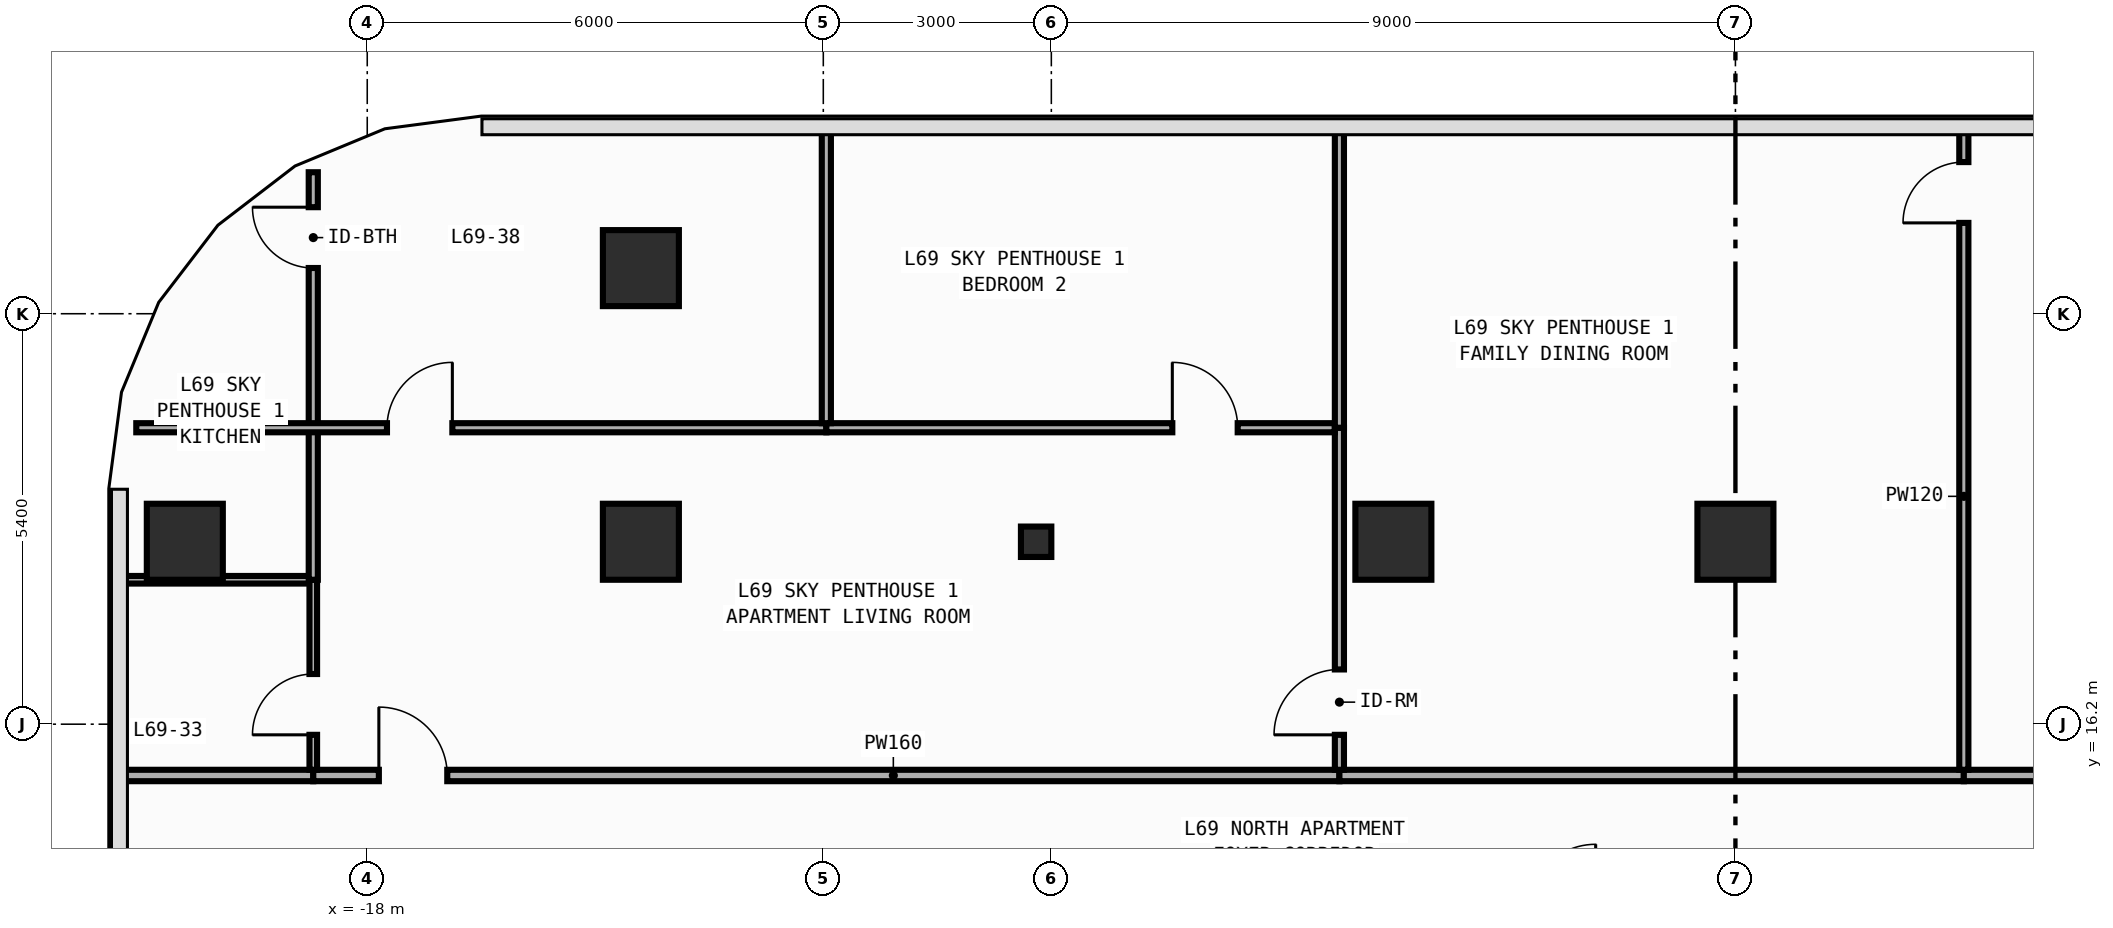
"""IFC4 building model, lengths in metres.
Left out: names, types, materials, properties, quantities, classifications, styles, units other than length and angle.
Written with IfcOpenShell. Run it as: python <this file> out.ifc"""

import sys

from ifc_helpers import new_model, si_unit, direction, frame, frame_2d, origin, origin_2d, place, context, subcontext, project, spatial, rectangle, circle, i_section, extrude, element, fill, save


model = new_model("IFC4")
c1 = context("Model", 3, precision=1e-05, world=origin(), true_north=direction((0.0, 1.0)))
c2 = subcontext(c1, "Body", "Model", "MODEL_VIEW")
j1 = project(units=[si_unit("LENGTHUNIT", "METRE"), si_unit("PLANEANGLEUNIT", "RADIAN")], contexts=[c1])
p1 = place(None, origin())
s1 = spatial("IfcSite", under=j1, at=p1, CompositionType="ELEMENT")
p2 = place(p1, origin())
s2 = spatial("IfcBuilding", under=s1, at=p2, CompositionType="ELEMENT")
p3 = place(p2, frame((0.0, 0.0, 289.0)))
s3 = spatial("IfcBuildingStorey", under=s2, at=p3, CompositionType="ELEMENT", Elevation=289.0)
p4 = place(p3, frame((-9.2, 18.6, 0.0), z_axis=(0.0, 0.0, 1.0), x_axis=(1.0, 0.0, 0.0)))
e1 = element("IfcColumn", 1, at=p4, inside=s3, PredefinedType="COLUMN", context=c2, shape_type="SweptSolid", body=[
    extrude(i_section(OverallWidth=0.4, OverallDepth=0.4, WebThickness=0.013, FlangeThickness=0.021, FilletRadius=0.022, at=origin_2d()), origin(), (0.0, 0.0, 1.0), 3.8),
])
for number, where, z_axis, x_axis in (
    (2, (-20.4, 18.6, 0.0), (0.0, 0.0, 1.0), (1.0, 0.0, 0.0)),
    (3, (-14.4, 18.6, 0.0), (0.0, 0.0, 1.0), (1.0, 0.0, 0.0)),
    (4, (-4.5, 18.6, 0.0), (0.0, 0.0, 1.0), (1.0, 0.0, 0.0)),
    (5, (0.0, 18.6, 0.0), (0.0, 0.0, 1.0), (1.0, 0.0, 0.0)),
    (6, (-14.4, 22.2, 0.0), (0.0, 0.0, 1.0), (1.0, 0.0, 0.0)),
):
    element("IfcColumn", number, at=place(p3, frame(where, z_axis=z_axis, x_axis=x_axis)), inside=s3, PredefinedType="COLUMN", context=c2, shape_type="SweptSolid", body=[
        extrude(circle(Radius=0.5, at=origin_2d()), origin(), (0.0, 0.0, 1.0), 3.8),
    ])
p5 = place(p3, frame((-21.255, 15.525, 0.0), z_axis=(0.0, 0.0, 1.0), x_axis=(1.0, 0.0, 0.0)))
e7 = element("IfcWall", 7, at=p5, inside=s3, PredefinedType="PARTITIONING", context=c2, shape_type="SweptSolid", body=[
    extrude(rectangle(XDim=2.545, YDim=0.15, at=frame_2d((1.272, 0.0))), origin(), (0.0, 0.0, 1.0), 3.54),
])
p6 = place(p3, frame((-18.71, 15.525, 0.0), z_axis=(0.0, 0.0, 1.0), x_axis=(1.0, 0.0, 0.0)))
e8 = element("IfcWall", 8, at=p6, inside=s3, PredefinedType="PARTITIONING", context=c2, shape_type="SweptSolid", body=[
    extrude(rectangle(XDim=13.5, YDim=0.15, at=frame_2d((6.75, 0.0))), origin(), (0.0, 0.0, 1.0), 3.54),
])
p7 = place(p6, frame((0.863, 0.0, 0.0)))
e9 = element("IfcOpeningElement", 9, at=p7, cuts=e8, PredefinedType="OPENING", context=c2, shape_type="SweptSolid", body=[
    extrude(rectangle(XDim=0.9, YDim=2.15, at=frame_2d((0.45, 1.075))), frame((0.0, 0.085, 0.0), z_axis=(0.0, -1.0, 0.0), x_axis=(1.0, 0.0, 0.0)), (0.0, 0.0, 1.0), 0.17),
])
p8 = place(p3, frame((-5.21, 15.525, 0.0), z_axis=(0.0, 0.0, 1.0), x_axis=(1.0, 0.0, 0.0)))
e10 = element("IfcWall", 10, at=p8, inside=s3, PredefinedType="PARTITIONING", context=c2, shape_type="SweptSolid", body=[
    extrude(rectangle(XDim=8.215, YDim=0.15, at=frame_2d((4.107, 0.0))), origin(), (0.0, 0.0, 1.0), 3.54),
])
p9 = place(p3, frame((3.005, 15.525, 0.0), z_axis=(0.0, 0.0, 1.0), x_axis=(1.0, 0.0, 0.0)))
e11 = element("IfcWall", 11, at=p9, inside=s3, PredefinedType="PARTITIONING", context=c2, shape_type="SweptSolid", body=[
    extrude(rectangle(XDim=6.435, YDim=0.15, at=frame_2d((3.218, 0.0))), origin(), (0.0, 0.0, 1.0), 3.54),
])
p10 = place(p3, frame((-21.255, 18.1, 0.0), z_axis=(0.0, 0.0, 1.0), x_axis=(1.0, 0.0, 0.0)))
e12 = element("IfcWall", 12, at=p10, inside=s3, PredefinedType="PARTITIONING", context=c2, shape_type="SweptSolid", body=[
    extrude(rectangle(XDim=2.495, YDim=0.1, at=frame_2d((1.248, 0.0))), origin(), (0.0, 0.0, 1.0), 3.54),
])
p11 = place(p3, frame((-18.71, 15.6, 0.0), z_axis=(0.0, 0.0, 1.0), x_axis=(0.0, 1.0, 0.0)))
e13 = element("IfcWall", 13, at=p11, inside=s3, PredefinedType="PARTITIONING", context=c2, shape_type="SweptSolid", body=[
    extrude(rectangle(XDim=2.5, YDim=0.1, at=frame_2d((1.25, 0.0))), origin(), (0.0, 0.0, 1.0), 3.54),
])
p12 = place(p11, frame((0.46, 0.0, 0.0)))
e14 = element("IfcOpeningElement", 14, at=p12, cuts=e13, PredefinedType="OPENING", context=c2, shape_type="SweptSolid", body=[
    extrude(rectangle(XDim=0.8, YDim=2.1, at=frame_2d((0.4, 1.05))), frame((0.0, 0.06, 0.0), z_axis=(0.0, -1.0, 0.0), x_axis=(1.0, 0.0, 0.0)), (0.0, 0.0, 1.0), 0.12),
])
p13 = place(p3, frame((-18.71, 18.1, 0.0), z_axis=(0.0, 0.0, 1.0), x_axis=(0.0, 1.0, 0.0)))
e15 = element("IfcWall", 15, at=p13, inside=s3, PredefinedType="PARTITIONING", context=c2, shape_type="SweptSolid", body=[
    extrude(rectangle(XDim=2.0, YDim=0.12, at=frame_2d((1.0, 0.0))), origin(), (0.0, 0.0, 1.0), 3.54),
])
p14 = place(p3, frame((-18.71, 20.1, 0.0), z_axis=(0.0, 0.0, 1.0), x_axis=(0.0, 1.0, 0.0)))
e16 = element("IfcWall", 16, at=p14, inside=s3, PredefinedType="PARTITIONING", context=c2, shape_type="SweptSolid", body=[
    extrude(rectangle(XDim=3.361, YDim=0.12, at=frame_2d((1.681, 0.0))), origin(), (0.0, 0.0, 1.0), 3.54),
])
p15 = place(p14, frame((2.102, 0.0, 0.0)))
e17 = element("IfcOpeningElement", 17, at=p15, cuts=e16, PredefinedType="OPENING", context=c2, shape_type="SweptSolid", body=[
    extrude(rectangle(XDim=0.8, YDim=2.1, at=frame_2d((0.4, 1.05))), frame((0.0, 0.07, 0.0), z_axis=(0.0, -1.0, 0.0), x_axis=(1.0, 0.0, 0.0)), (0.0, 0.0, 1.0), 0.14),
])
p16 = place(p3, frame((-5.21, 15.6, 0.0), z_axis=(0.0, 0.0, 1.0), x_axis=(0.0, 1.0, 0.0)))
e18 = element("IfcWall", 18, at=p16, inside=s3, PredefinedType="PARTITIONING", context=c2, shape_type="SweptSolid", body=[
    extrude(rectangle(XDim=4.5, YDim=0.12, at=frame_2d((2.25, 0.0))), origin(), (0.0, 0.0, 1.0), 3.54),
])
p17 = place(p16, frame((0.46, 0.0, 0.0)))
e19 = element("IfcOpeningElement", 19, at=p17, cuts=e18, PredefinedType="OPENING", context=c2, shape_type="SweptSolid", body=[
    extrude(rectangle(XDim=0.86, YDim=2.15, at=frame_2d((0.43, 1.075))), frame((0.0, 0.07, 0.0), z_axis=(0.0, -1.0, 0.0), x_axis=(1.0, 0.0, 0.0)), (0.0, 0.0, 1.0), 0.14),
])
p18 = place(p3, frame((-21.039, 20.1, 0.0), z_axis=(0.0, 0.0, 1.0), x_axis=(1.0, 0.0, 0.0)))
e20 = element("IfcWall", 20, at=p18, inside=s3, PredefinedType="PARTITIONING", context=c2, shape_type="SweptSolid", body=[
    extrude(rectangle(XDim=9.079, YDim=0.12, at=frame_2d((4.539, 0.0))), origin(), (0.0, 0.0, 1.0), 3.54),
])
p19 = place(p18, frame((3.298, 0.0, 0.0)))
e21 = element("IfcOpeningElement", 21, at=p19, cuts=e20, PredefinedType="OPENING", context=c2, shape_type="SweptSolid", body=[
    extrude(rectangle(XDim=0.86, YDim=2.15, at=frame_2d((0.43, 1.075))), frame((0.0, 0.07, 0.0), z_axis=(0.0, -1.0, 0.0), x_axis=(1.0, 0.0, 0.0)), (0.0, 0.0, 1.0), 0.14),
])
p20 = place(p3, frame((-11.96, 20.1, 0.0), z_axis=(0.0, 0.0, 1.0), x_axis=(1.0, 0.0, 0.0)))
e22 = element("IfcWall", 22, at=p20, inside=s3, PredefinedType="PARTITIONING", context=c2, shape_type="SweptSolid", body=[
    extrude(rectangle(XDim=6.69, YDim=0.12, at=frame_2d((3.345, 0.0))), origin(), (0.0, 0.0, 1.0), 3.54),
])
p21 = place(p20, frame((4.552, 0.0, 0.0)))
e23 = element("IfcOpeningElement", 23, at=p21, cuts=e22, PredefinedType="OPENING", context=c2, shape_type="SweptSolid", body=[
    extrude(rectangle(XDim=0.86, YDim=2.15, at=frame_2d((0.43, 1.075))), frame((0.0, 0.07, 0.0), z_axis=(0.0, -1.0, 0.0), x_axis=(1.0, 0.0, 0.0)), (0.0, 0.0, 1.0), 0.14),
])
p22 = place(p3, frame((3.005, 15.6, 0.0), z_axis=(0.0, 0.0, 1.0), x_axis=(0.0, 1.0, 0.0)))
e24 = element("IfcWall", 24, at=p22, inside=s3, PredefinedType="PARTITIONING", context=c2, shape_type="SweptSolid", body=[
    extrude(rectangle(XDim=8.455, YDim=0.12, at=frame_2d((4.228, 0.0))), origin(), (0.0, 0.0, 1.0), 3.54),
])
p23 = place(p22, frame((7.195, 0.0, 0.0)))
e25 = element("IfcOpeningElement", 25, at=p23, cuts=e24, PredefinedType="OPENING", context=c2, shape_type="SweptSolid", body=[
    extrude(rectangle(XDim=0.8, YDim=2.1, at=frame_2d((0.4, 1.05))), frame((0.0, 0.07, 0.0), z_axis=(0.0, -1.0, 0.0), x_axis=(1.0, 0.0, 0.0)), (0.0, 0.0, 1.0), 0.14),
])
p24 = place(p3, frame((-5.21, 20.1, 0.0), z_axis=(0.0, 0.0, 1.0), x_axis=(0.0, 1.0, 0.0)))
e26 = element("IfcWall", 26, at=p24, inside=s3, PredefinedType="PARTITIONING", context=c2, shape_type="SweptSolid", body=[
    extrude(rectangle(XDim=3.955, YDim=0.12, at=frame_2d((1.978, 0.0))), origin(), (0.0, 0.0, 1.0), 3.54),
])
p25 = place(p3, frame((-11.96, 20.16, 0.0), z_axis=(0.0, 0.0, 1.0), x_axis=(0.0, 1.0, 0.0)))
e27 = element("IfcWall", 27, at=p25, inside=s3, PredefinedType="PARTITIONING", context=c2, shape_type="SweptSolid", body=[
    extrude(rectangle(XDim=3.895, YDim=0.12, at=frame_2d((1.948, 0.0))), origin(), (0.0, 0.0, 1.0), 3.54),
])
p26 = place(p7, origin())
e28 = element("IfcDoor", 28, at=p26, inside=s3, OperationType="SINGLE_SWING_LEFT", PredefinedType="DOOR", context=c2, shape_type="SweptSolid", body=[
    extrude(rectangle(XDim=0.9, YDim=2.15, at=frame_2d((0.45, 1.075))), frame((0.0, 0.025, 0.0), z_axis=(0.0, -1.0, 0.0), x_axis=(1.0, 0.0, 0.0)), (0.0, 0.0, 1.0), 0.05),
])
fill(e9, e28)
p27 = place(p12, origin())
e29 = element("IfcDoor", 29, at=p27, inside=s3, OperationType="SINGLE_SWING_LEFT", PredefinedType="DOOR", context=c2, shape_type="SweptSolid", body=[
    extrude(rectangle(XDim=0.8, YDim=2.1, at=frame_2d((0.4, 1.05))), frame((0.0, 0.025, 0.0), z_axis=(0.0, -1.0, 0.0), x_axis=(1.0, 0.0, 0.0)), (0.0, 0.0, 1.0), 0.05),
])
fill(e14, e29)
p28 = place(p17, origin())
e30 = element("IfcDoor", 30, at=p28, inside=s3, OperationType="SINGLE_SWING_LEFT", PredefinedType="DOOR", context=c2, shape_type="SweptSolid", body=[
    extrude(rectangle(XDim=0.86, YDim=2.15, at=frame_2d((0.43, 1.075))), frame((0.0, 0.025, 0.0), z_axis=(0.0, -1.0, 0.0), x_axis=(1.0, 0.0, 0.0)), (0.0, 0.0, 1.0), 0.05),
])
fill(e19, e30)
p29 = place(p19, origin())
e31 = element("IfcDoor", 31, at=p29, inside=s3, OperationType="SINGLE_SWING_RIGHT", PredefinedType="DOOR", context=c2, shape_type="SweptSolid", body=[
    extrude(rectangle(XDim=0.86, YDim=2.15, at=frame_2d((0.43, 1.075))), frame((0.0, 0.025, 0.0), z_axis=(0.0, -1.0, 0.0), x_axis=(1.0, 0.0, 0.0)), (0.0, 0.0, 1.0), 0.05),
])
fill(e21, e31)
p30 = place(p21, origin())
e32 = element("IfcDoor", 32, at=p30, inside=s3, OperationType="SINGLE_SWING_LEFT", PredefinedType="DOOR", context=c2, shape_type="SweptSolid", body=[
    extrude(rectangle(XDim=0.86, YDim=2.15, at=frame_2d((0.43, 1.075))), frame((0.0, 0.025, 0.0), z_axis=(0.0, -1.0, 0.0), x_axis=(1.0, 0.0, 0.0)), (0.0, 0.0, 1.0), 0.05),
])
fill(e23, e32)
p31 = place(p23, origin())
e33 = element("IfcDoor", 33, at=p31, inside=s3, OperationType="SINGLE_SWING_LEFT", PredefinedType="DOOR", context=c2, shape_type="SweptSolid", body=[
    extrude(rectangle(XDim=0.8, YDim=2.1, at=frame_2d((0.4, 1.05))), frame((0.0, 0.025, 0.0), z_axis=(0.0, -1.0, 0.0), x_axis=(1.0, 0.0, 0.0)), (0.0, 0.0, 1.0), 0.05),
])
fill(e25, e33)
p32 = place(p15, origin())
e34 = element("IfcDoor", 34, at=p32, inside=s3, OperationType="SINGLE_SWING_RIGHT", PredefinedType="DOOR", context=c2, shape_type="SweptSolid", body=[
    extrude(rectangle(XDim=0.8, YDim=2.1, at=frame_2d((0.4, 1.05))), frame((0.0, 0.025, 0.0), z_axis=(0.0, -1.0, 0.0), x_axis=(1.0, 0.0, 0.0)), (0.0, 0.0, 1.0), 0.05),
])
fill(e17, e34)
save(model, sys.argv[1])
